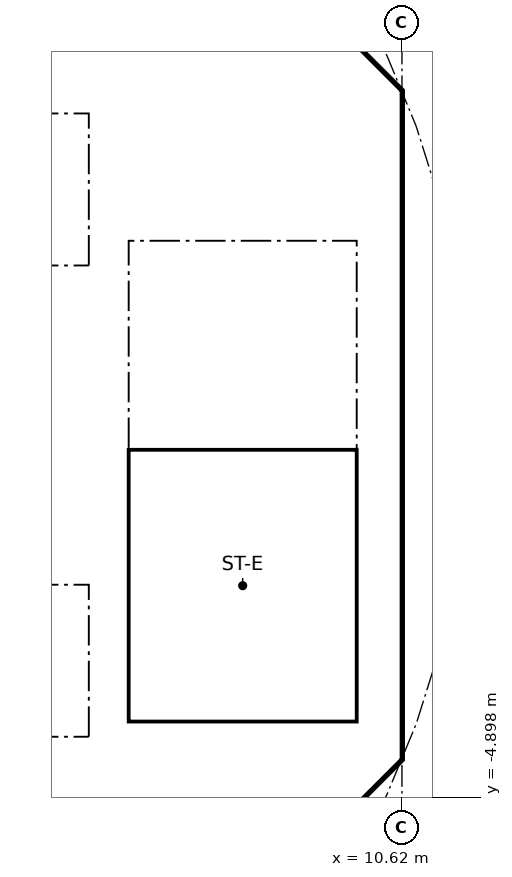
"""IFC4 building model, lengths in metres.
Left out: names, types, materials, properties, quantities, classifications, styles, units other than length and angle.
Written with IfcOpenShell. Run it as: python <this file> out.ifc"""

import sys

from ifc_helpers import new_model, si_unit, direction, frame, frame_2d, origin, place, context, subcontext, project, spatial, polyline, rectangle, outline, extrude, element, fill, save


model = new_model("IFC4")
c1 = context("Model", 3, precision=1e-05, world=origin(), true_north=direction((0.0, 1.0)))
c2 = subcontext(c1, "Body", "Model", "MODEL_VIEW")
j1 = project(units=[si_unit("LENGTHUNIT", "METRE"), si_unit("PLANEANGLEUNIT", "RADIAN")], contexts=[c1])
p1 = place(None, origin())
s1 = spatial("IfcSite", under=j1, at=p1, CompositionType="ELEMENT")
p2 = place(p1, origin())
s2 = spatial("IfcBuilding", under=s1, at=p2, CompositionType="ELEMENT")
p3 = place(p2, frame((0.0, 0.0, 265.9)))
s3 = spatial("IfcBuildingStorey", under=s2, at=p3, CompositionType="ELEMENT", Elevation=265.9)
p4 = place(p3, frame((9.988, 4.613, 0.0), z_axis=(0.0, 0.0, 1.0), x_axis=(-0.707106781187, 0.707106781187, 0.0)))
e1 = element("IfcWall", 1, at=p4, inside=s3, PredefinedType="SHEAR", context=c2, shape_type="SweptSolid", body=[
    extrude(rectangle(XDim=7.602, YDim=0.6, at=frame_2d((3.801, 0.0))), origin(), (0.0, 0.0, 1.0), 3.44),
])
p5 = place(p4, frame((3.201, 0.0, 0.0)))
e2 = element("IfcOpeningElement", 2, at=p5, cuts=e1, PredefinedType="OPENING", context=c2, shape_type="SweptSolid", body=[
    extrude(rectangle(XDim=1.2, YDim=2.1, at=frame_2d((0.6, 1.05))), frame((0.0, 0.31, 0.0), z_axis=(0.0, -1.0, 0.0), x_axis=(1.0, 0.0, 0.0)), (0.0, 0.0, 1.0), 0.62),
])
p6 = place(p3, frame((4.613, -9.988, 0.0), z_axis=(0.0, 0.0, 1.0), x_axis=(0.707106781187, 0.707106781187, 0.0)))
e3 = element("IfcWall", 3, at=p6, inside=s3, PredefinedType="SHEAR", context=c2, shape_type="SweptSolid", body=[
    extrude(rectangle(XDim=7.602, YDim=0.6, at=frame_2d((3.801, 0.0))), origin(), (0.0, 0.0, 1.0), 3.44),
])
p7 = place(p6, frame((3.201, 0.0, 0.0)))
e4 = element("IfcOpeningElement", 4, at=p7, cuts=e3, PredefinedType="OPENING", context=c2, shape_type="SweptSolid", body=[
    extrude(rectangle(XDim=1.2, YDim=2.1, at=frame_2d((0.6, 1.05))), frame((0.0, 0.31, 0.0), z_axis=(0.0, -1.0, 0.0), x_axis=(1.0, 0.0, 0.0)), (0.0, 0.0, 1.0), 0.62),
])
p8 = place(p3, frame((-6.7, 2.0, 0.0), z_axis=(0.0, 0.0, 1.0), x_axis=(1.0, 0.0, 0.0)))
e5 = element("IfcWall", 5, at=p8, inside=s3, PredefinedType="SOLIDWALL", context=c2, shape_type="SweptSolid", body=[
    extrude(rectangle(XDim=13.4, YDim=0.2, at=frame_2d((6.7, 0.0))), origin(), (0.0, 0.0, 1.0), 3.44),
])
p9 = place(p8, frame((11.65, 0.0, 0.0)))
e6 = element("IfcOpeningElement", 6, at=p9, cuts=e5, PredefinedType="OPENING", context=c2, shape_type="SweptSolid", body=[
    extrude(rectangle(XDim=1.1, YDim=2.1, at=frame_2d((0.55, 1.05))), frame((0.0, 0.11, 0.0), z_axis=(0.0, -1.0, 0.0), x_axis=(1.0, 0.0, 0.0)), (0.0, 0.0, 1.0), 0.22),
])
p10 = place(p8, frame((0.75, 0.0, 0.0)))
e7 = element("IfcOpeningElement", 7, at=p10, cuts=e5, PredefinedType="OPENING", context=c2, shape_type="SweptSolid", body=[
    extrude(rectangle(XDim=0.9, YDim=2.1, at=frame_2d((0.45, 1.05))), frame((0.0, 0.11, 0.0), z_axis=(0.0, -1.0, 0.0), x_axis=(1.0, 0.0, 0.0)), (0.0, 0.0, 1.0), 0.22),
])
p11 = place(p8, frame((4.05, 0.0, 0.0)))
e8 = element("IfcOpeningElement", 8, at=p11, cuts=e5, PredefinedType="OPENING", context=c2, shape_type="SweptSolid", body=[
    extrude(rectangle(XDim=0.9, YDim=2.1, at=frame_2d((0.45, 1.05))), frame((0.0, 0.11, 0.0), z_axis=(0.0, -1.0, 0.0), x_axis=(1.0, 0.0, 0.0)), (0.0, 0.0, 1.0), 0.22),
])
p12 = place(p8, frame((7.35, 0.0, 0.0)))
e9 = element("IfcOpeningElement", 9, at=p12, cuts=e5, PredefinedType="OPENING", context=c2, shape_type="SweptSolid", body=[
    extrude(rectangle(XDim=0.9, YDim=2.1, at=frame_2d((0.45, 1.05))), frame((0.0, 0.11, 0.0), z_axis=(0.0, -1.0, 0.0), x_axis=(1.0, 0.0, 0.0)), (0.0, 0.0, 1.0), 0.22),
])
p13 = place(p8, frame((9.55, 0.0, 0.0)))
e10 = element("IfcOpeningElement", 10, at=p13, cuts=e5, PredefinedType="OPENING", context=c2, shape_type="SweptSolid", body=[
    extrude(rectangle(XDim=0.9, YDim=2.1, at=frame_2d((0.45, 1.05))), frame((0.0, 0.11, 0.0), z_axis=(0.0, -1.0, 0.0), x_axis=(1.0, 0.0, 0.0)), (0.0, 0.0, 1.0), 0.22),
])
p14 = place(p3, frame((6.7, 4.0, 0.0), z_axis=(0.0, 0.0, 1.0), x_axis=(1.0, 0.0, 0.0)))
e11 = element("IfcWall", 11, at=p14, inside=s3, PredefinedType="SOLIDWALL", context=c2, shape_type="SweptSolid", body=[
    extrude(rectangle(XDim=3.325, YDim=0.2, at=frame_2d((1.662, 0.0))), origin(), (0.0, 0.0, 1.0), 3.44),
])
p15 = place(p14, frame((1.25, 0.0, 0.0)))
e12 = element("IfcOpeningElement", 12, at=p15, cuts=e11, PredefinedType="OPENING", context=c2, shape_type="SweptSolid", body=[
    extrude(rectangle(XDim=1.1, YDim=2.1, at=frame_2d((0.55, 1.05))), frame((0.0, 0.11, 0.0), z_axis=(0.0, -1.0, 0.0), x_axis=(1.0, 0.0, 0.0)), (0.0, 0.0, 1.0), 0.22),
])
p16 = place(p3, frame((-6.7, -2.0, 0.0), z_axis=(0.0, 0.0, 1.0), x_axis=(1.0, 0.0, 0.0)))
e13 = element("IfcWall", 13, at=p16, inside=s3, PredefinedType="SOLIDWALL", context=c2, shape_type="SweptSolid", body=[
    extrude(rectangle(XDim=13.4, YDim=0.2, at=frame_2d((6.7, 0.0))), origin(), (0.0, 0.0, 1.0), 3.44),
])
p17 = place(p16, frame((9.45, 0.0, 0.0)))
e14 = element("IfcOpeningElement", 14, at=p17, cuts=e13, PredefinedType="OPENING", context=c2, shape_type="SweptSolid", body=[
    extrude(rectangle(XDim=1.1, YDim=2.1, at=frame_2d((0.55, 1.05))), frame((0.0, 0.11, 0.0), z_axis=(0.0, -1.0, 0.0), x_axis=(1.0, 0.0, 0.0)), (0.0, 0.0, 1.0), 0.22),
])
p18 = place(p16, frame((11.65, 0.0, 0.0)))
e15 = element("IfcOpeningElement", 15, at=p18, cuts=e13, PredefinedType="OPENING", context=c2, shape_type="SweptSolid", body=[
    extrude(rectangle(XDim=1.1, YDim=2.1, at=frame_2d((0.55, 1.05))), frame((0.0, 0.11, 0.0), z_axis=(0.0, -1.0, 0.0), x_axis=(1.0, 0.0, 0.0)), (0.0, 0.0, 1.0), 0.22),
])
p19 = place(p16, frame((1.85, 0.0, 0.0)))
e16 = element("IfcOpeningElement", 16, at=p19, cuts=e13, PredefinedType="OPENING", context=c2, shape_type="SweptSolid", body=[
    extrude(rectangle(XDim=0.9, YDim=2.1, at=frame_2d((0.45, 1.05))), frame((0.0, 0.11, 0.0), z_axis=(0.0, -1.0, 0.0), x_axis=(1.0, 0.0, 0.0)), (0.0, 0.0, 1.0), 0.22),
])
p20 = place(p16, frame((6.25, 0.0, 0.0)))
e17 = element("IfcOpeningElement", 17, at=p20, cuts=e13, PredefinedType="OPENING", context=c2, shape_type="SweptSolid", body=[
    extrude(rectangle(XDim=0.9, YDim=2.1, at=frame_2d((0.45, 1.05))), frame((0.0, 0.11, 0.0), z_axis=(0.0, -1.0, 0.0), x_axis=(1.0, 0.0, 0.0)), (0.0, 0.0, 1.0), 0.22),
])
p21 = place(p3, origin())
e18 = element("IfcWall", 18, at=p21, inside=s3, PredefinedType="SHEAR", context=c2, shape_type="SweptSolid", body=[
    extrude(outline(polyline([(9.776, -4.401), (10.025, -4.152), (10.025, -3.801), (10.025, 4.152), (9.776, 4.401), (10.2, 4.825), (10.625, 4.401), (10.625, -4.401), (10.2, -4.825), (9.776, -4.401)])), origin(), (0.0, 0.0, 1.0), 3.44),
])
p22 = place(p3, origin())
e19 = element("IfcWall", 19, at=p22, inside=s3, PredefinedType="SOLIDWALL", context=c2, shape_type="SweptSolid", body=[
    extrude(outline(polyline([(-6.7, 4.3), (6.7, 4.3), (6.7, 2.1), (6.5, 2.1), (6.5, 4.1), (4.5, 4.1), (4.5, 2.1), (4.3, 2.1), (4.3, 4.1), (2.3, 4.1), (2.3, 2.1), (2.1, 2.1), (2.1, 4.1), (0.1, 4.1), (0.1, 2.1), (-0.1, 2.1), (-0.1, 4.1), (-4.3, 4.1), (-4.3, 2.1), (-4.5, 2.1), (-4.5, 4.1), (-6.5, 4.1), (-6.5, 2.1), (-6.7, 2.1), (-6.7, 4.3)])), origin(), (0.0, 0.0, 1.0), 3.44),
])
p23 = place(p3, origin())
e20 = element("IfcWall", 20, at=p23, inside=s3, PredefinedType="SOLIDWALL", context=c2, shape_type="SweptSolid", body=[
    extrude(outline(polyline([(-6.7, -2.1), (-6.5, -2.1), (-6.5, -4.1), (-2.3, -4.1), (-2.3, -2.1), (-2.1, -2.1), (-2.1, -4.1), (2.1, -4.1), (2.1, -2.1), (2.3, -2.1), (2.3, -4.1), (4.3, -4.1), (4.3, -2.1), (4.5, -2.1), (4.5, -4.1), (6.5, -4.1), (6.5, -2.1), (6.7, -2.1), (6.7, -4.3), (-6.7, -4.3), (-6.7, -2.1)])), origin(), (0.0, 0.0, 1.0), 3.44),
])
p24 = place(p3, origin())
e21 = element("IfcWall", 21, at=p24, inside=s3, PredefinedType="SOLIDWALL", context=c2, shape_type="SweptSolid", body=[
    extrude(outline(polyline([(7.025, -3.9), (6.7, -3.9), (6.7, 3.9), (7.025, 3.9), (7.025, -3.9)])), origin(), (0.0, 0.0, 1.0), 3.44),
])
p25 = place(p3, origin())
e22 = element("IfcWall", 22, at=p25, inside=s3, PredefinedType="SOLIDWALL", context=c2, shape_type="SweptSolid", body=[
    extrude(outline(polyline([(10.025, -4.1), (6.7, -4.1), (6.7, -3.9), (10.025, -3.9), (10.025, -4.1)])), origin(), (0.0, 0.0, 1.0), 3.44),
])
p26 = place(p9, origin())
e23 = element("IfcDoor", 23, at=p26, inside=s3, OperationType="DOUBLE_DOOR_SLIDING", PredefinedType="DOOR", context=c2, shape_type="SweptSolid", body=[
    extrude(rectangle(XDim=1.1, YDim=2.1, at=frame_2d((0.55, 1.05))), frame((0.0, 0.025, 0.0), z_axis=(0.0, -1.0, 0.0), x_axis=(1.0, 0.0, 0.0)), (0.0, 0.0, 1.0), 0.05),
])
fill(e6, e23)
p27 = place(p18, origin())
e24 = element("IfcDoor", 24, at=p27, inside=s3, OperationType="DOUBLE_DOOR_SLIDING", PredefinedType="DOOR", context=c2, shape_type="SweptSolid", body=[
    extrude(rectangle(XDim=1.1, YDim=2.1, at=frame_2d((0.55, 1.05))), frame((0.0, 0.025, 0.0), z_axis=(0.0, -1.0, 0.0), x_axis=(1.0, 0.0, 0.0)), (0.0, 0.0, 1.0), 0.05),
])
fill(e15, e24)
p28 = place(p15, frame((1.1, 0.0, 0.0), x_axis=(-1.0, 0.0, 0.0)))
e25 = element("IfcDoor", 25, at=p28, inside=s3, OperationType="SINGLE_SWING_RIGHT", PredefinedType="DOOR", context=c2, shape_type="SweptSolid", body=[
    extrude(rectangle(XDim=1.1, YDim=2.1, at=frame_2d((0.55, 1.05))), frame((0.0, 0.025, 0.0), z_axis=(0.0, -1.0, 0.0), x_axis=(1.0, 0.0, 0.0)), (0.0, 0.0, 1.0), 0.05),
])
fill(e12, e25)
save(model, sys.argv[1])
